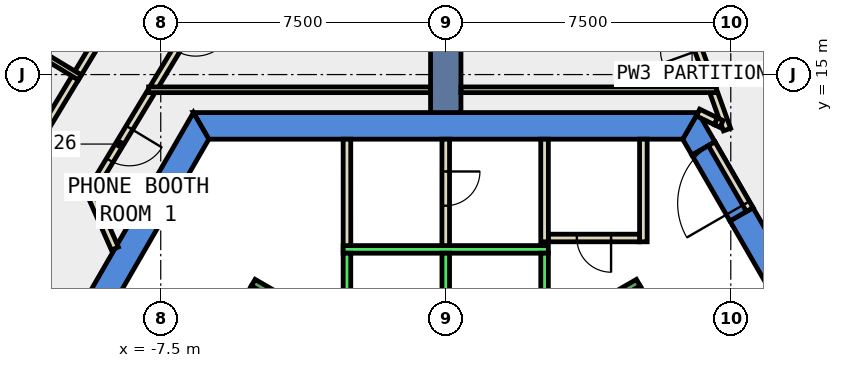
"""IFC4 building model, lengths in metres.
Left out: names, types, materials, properties, quantities, classifications, styles, units other than length and angle.
Written with IfcOpenShell. Run it as: python <this file> out.ifc"""

import sys

from ifc_helpers import new_model, si_unit, direction, frame, frame_2d, origin, place, context, subcontext, project, spatial, polyline, rectangle, outline, extrude, element, fill, save


model = new_model("IFC4")
c1 = context("Model", 3, precision=1e-05, world=origin(), true_north=direction((0.0, 1.0)))
c2 = subcontext(c1, "Body", "Model", "MODEL_VIEW")
j1 = project(units=[si_unit("LENGTHUNIT", "METRE"), si_unit("PLANEANGLEUNIT", "RADIAN")], contexts=[c1])
p1 = place(None, origin())
s1 = spatial("IfcSite", under=j1, at=p1, CompositionType="ELEMENT")
p2 = place(p1, origin())
s2 = spatial("IfcBuilding", under=s1, at=p2, CompositionType="ELEMENT")
p3 = place(p2, frame((0.0, 0.0, 194.0)))
s3 = spatial("IfcBuildingStorey", under=s2, at=p3, CompositionType="ELEMENT", Elevation=194.0)
p4 = place(p3, frame((0.0, 0.0, -0.4)))
e1 = element("IfcWall", 1, at=p4, inside=s3, PredefinedType="SHEAR", context=c2, shape_type="SweptSolid", body=[
    extrude(outline(polyline([(8.084, 11.498), (7.478, 11.148), (12.471, 2.5), (13.279, 2.5), (8.084, 11.498)])), origin(), (0.0, 0.0, 1.0), 4.2),
])
p5 = place(p3, frame((0.0, 0.0, -0.4)))
e2 = element("IfcWall", 2, at=p5, inside=s3, PredefinedType="SHEAR", context=c2, shape_type="SweptSolid", body=[
    extrude(outline(polyline([(6.478, 12.88), (7.084, 13.23), (6.64, 14.0), (6.235, 13.3), (6.478, 12.88)])), origin(), (0.0, 0.0, 1.0), 4.2),
])
p6 = place(p3, frame((0.0, 0.0, 3.6)))
e3 = element("IfcWall", 3, at=p6, inside=s3, PredefinedType="SHEAR", context=c2, shape_type="SweptSolid", body=[
    extrude(outline(polyline([(7.084, 13.23), (6.478, 12.88), (7.478, 11.148), (8.084, 11.498), (7.084, 13.23)])), origin(), (0.0, 0.0, 1.0), 0.2),
])
p7 = place(p3, frame((0.0, 0.0, -0.4)))
e4 = element("IfcWall", 4, at=p7, inside=s3, PredefinedType="SHEAR", context=c2, shape_type="SweptSolid", body=[
    extrude(outline(polyline([(6.64, 14.0), (-6.64, 14.0), (-6.235, 13.3), (6.235, 13.3), (6.64, 14.0)])), origin(), (0.0, 0.0, 1.0), 4.2),
])
p8 = place(p3, frame((0.0, 0.0, -0.4)))
e5 = element("IfcWall", 5, at=p8, inside=s3, PredefinedType="SHEAR", context=c2, shape_type="SweptSolid", body=[
    extrude(outline(polyline([(-11.834, 5.002), (-11.228, 4.652), (-6.235, 13.3), (-6.64, 14.0), (-11.834, 5.002)])), origin(), (0.0, 0.0, 1.0), 4.2),
])
p9 = place(p3, frame((0.0, 14.0, -0.4), z_axis=(0.0, 0.0, 1.0), x_axis=(0.0, 1.0, 0.0)))
e6 = element("IfcWall", 6, at=p9, inside=s3, PredefinedType="SHEAR", context=c2, shape_type="SweptSolid", body=[
    extrude(rectangle(XDim=9.0, YDim=0.8, at=frame_2d((4.5, 0.0))), origin(), (0.0, 0.0, 1.0), 4.2),
])
p10 = place(p3, frame((6.64, 14.0, 0.0), z_axis=(0.0, 0.0, 1.0), x_axis=(0.899046412443, -0.437853341055, 0.0)))
e7 = element("IfcWall", 7, at=p10, inside=s3, PredefinedType="PARTITIONING", context=c2, shape_type="SweptSolid", body=[
    extrude(rectangle(XDim=0.523, YDim=0.2, at=frame_2d((0.261, 0.0))), origin(), (0.0, 0.0, 1.0), 3.8),
])
p11 = place(p3, frame((7.401, 13.552, 0.0), z_axis=(0.0, 0.0, 1.0), x_axis=(-0.337944878606, 0.941165904091, 0.0)))
e8 = element("IfcWall", 8, at=p11, inside=s3, PredefinedType="PARTITIONING", context=c2, shape_type="SweptSolid", body=[
    extrude(rectangle(XDim=1.038, YDim=0.2, at=frame_2d((0.519, 0.0))), origin(), (0.0, 0.0, 1.0), 3.8),
])
p12 = place(p3, frame((-7.759, 14.536, 0.0), z_axis=(0.0, 0.0, 1.0), x_axis=(-0.516926279395, -0.856029918678, 0.0)))
e9 = element("IfcWall", 9, at=p12, inside=s3, PredefinedType="PARTITIONING", context=c2, shape_type="SweptSolid", body=[
    extrude(rectangle(XDim=3.188, YDim=0.2, at=frame_2d((1.594, 0.0))), origin(), (0.0, 0.0, 1.0), 3.8),
])
p13 = place(p12, frame((1.094, 0.0, 0.0)))
e10 = element("IfcOpeningElement", 10, at=p13, cuts=e9, PredefinedType="OPENING", context=c2, shape_type="SweptSolid", body=[
    extrude(rectangle(XDim=1.0, YDim=2.1, at=frame_2d((0.5, 1.05))), frame((0.0, 0.11, 0.0), z_axis=(0.0, -1.0, 0.0), x_axis=(1.0, 0.0, 0.0)), (0.0, 0.0, 1.0), 0.22),
])
p14 = place(p3, frame((-9.315, 11.801, 0.0), z_axis=(0.0, 0.0, 1.0), x_axis=(0.403943240321, -0.914784050254, 0.0)))
e11 = element("IfcWall", 11, at=p14, inside=s3, PredefinedType="PARTITIONING", context=c2, shape_type="SweptSolid", body=[
    extrude(rectangle(XDim=1.507, YDim=0.2, at=frame_2d((0.754, 0.0))), origin(), (0.0, 0.0, 1.0), 3.8),
])
p15 = place(p3, frame((6.999, 14.671, 0.0), z_axis=(0.0, 0.0, 1.0), x_axis=(-0.338795881304, 0.940859899672, 0.0)))
e12 = element("IfcWall", 12, at=p15, inside=s3, PredefinedType="PARTITIONING", context=c2, shape_type="SweptSolid", body=[
    extrude(rectangle(XDim=3.055, YDim=0.2, at=frame_2d((1.527, 0.0))), origin(), (0.0, 0.0, 1.0), 3.8),
])
p16 = place(p15, frame((1.027, 0.0, 0.0)))
e13 = element("IfcOpeningElement", 13, at=p16, cuts=e12, PredefinedType="OPENING", context=c2, shape_type="SweptSolid", body=[
    extrude(rectangle(XDim=1.0, YDim=2.1, at=frame_2d((0.5, 1.05))), frame((0.0, 0.11, 0.0), z_axis=(0.0, -1.0, 0.0), x_axis=(1.0, 0.0, 0.0)), (0.0, 0.0, 1.0), 0.22),
])
p17 = place(p3, frame((-5.998, 17.451, 0.0), z_axis=(0.0, 0.0, 1.0), x_axis=(-0.516919907997, -0.856033766108, 0.0)))
e14 = element("IfcWall", 14, at=p17, inside=s3, PredefinedType="PARTITIONING", context=c2, shape_type="SweptSolid", body=[
    extrude(rectangle(XDim=3.256, YDim=0.2, at=frame_2d((1.628, 0.0))), origin(), (0.0, 0.0, 1.0), 3.8),
])
p18 = place(p17, frame((1.128, 0.0, 0.0)))
e15 = element("IfcOpeningElement", 15, at=p18, cuts=e14, PredefinedType="OPENING", context=c2, shape_type="SweptSolid", body=[
    extrude(rectangle(XDim=1.0, YDim=2.1, at=frame_2d((0.5, 1.05))), frame((0.0, 0.11, 0.0), z_axis=(0.0, -1.0, 0.0), x_axis=(1.0, 0.0, 0.0)), (0.0, 0.0, 1.0), 0.22),
])
p19 = place(p3, frame((7.615, 18.449, 0.0), z_axis=(0.0, 0.0, 1.0), x_axis=(0.516918251554, -0.856034766356, 0.0)))
e16 = element("IfcWall", 16, at=p19, inside=s3, PredefinedType="PARTITIONING", context=c2, shape_type="SweptSolid", body=[
    extrude(rectangle(XDim=3.983, YDim=0.2, at=frame_2d((1.992, 0.0))), origin(), (0.0, 0.0, 1.0), 3.8),
])
p20 = place(p19, frame((1.492, 0.0, 0.0)))
e17 = element("IfcOpeningElement", 17, at=p20, cuts=e16, PredefinedType="OPENING", context=c2, shape_type="SweptSolid", body=[
    extrude(rectangle(XDim=1.0, YDim=2.1, at=frame_2d((0.5, 1.05))), frame((0.0, 0.11, 0.0), z_axis=(0.0, -1.0, 0.0), x_axis=(1.0, 0.0, 0.0)), (0.0, 0.0, 1.0), 0.22),
])
p21 = place(p3, frame((-9.674, 15.039, 0.0), z_axis=(0.0, 0.0, 1.0), x_axis=(0.516918251554, 0.856034766356, 0.0)))
e18 = element("IfcWall", 18, at=p21, inside=s3, PredefinedType="PARTITIONING", context=c2, shape_type="SweptSolid", body=[
    extrude(rectangle(XDim=3.983, YDim=0.2, at=frame_2d((1.992, 0.0))), origin(), (0.0, 0.0, 1.0), 3.8),
])
p22 = place(p3, frame((-11.811, 11.503, 0.0), z_axis=(0.0, 0.0, 1.0), x_axis=(0.517135291957, 0.855903668535, 0.0)))
e19 = element("IfcWall", 19, at=p22, inside=s3, PredefinedType="PARTITIONING", context=c2, shape_type="SweptSolid", body=[
    extrude(rectangle(XDim=3.982, YDim=0.2, at=frame_2d((1.991, 0.0))), origin(), (0.0, 0.0, 1.0), 3.8),
])
p23 = place(p3, frame((5.2, 13.3, 0.0), z_axis=(0.0, 0.0, 1.0), x_axis=(0.0, -1.0, 0.0)))
e20 = element("IfcWall", 20, at=p23, inside=s3, PredefinedType="PARTITIONING", context=c2, shape_type="SweptSolid", body=[
    extrude(rectangle(XDim=2.7, YDim=0.2, at=frame_2d((1.35, 0.0))), origin(), (0.0, 0.0, 1.0), 3.8),
])
p24 = place(p3, frame((5.1, 10.7, 0.0), z_axis=(0.0, 0.0, 1.0), x_axis=(-1.0, 0.0, 0.0)))
e21 = element("IfcWall", 21, at=p24, inside=s3, PredefinedType="PARTITIONING", context=c2, shape_type="SweptSolid", body=[
    extrude(rectangle(XDim=2.4, YDim=0.2, at=frame_2d((1.2, 0.0))), origin(), (0.0, 0.0, 1.0), 3.8),
])
p25 = place(p24, frame((0.75, 0.0, 0.0)))
e22 = element("IfcOpeningElement", 22, at=p25, cuts=e21, PredefinedType="OPENING", context=c2, shape_type="SweptSolid", body=[
    extrude(rectangle(XDim=0.9, YDim=2.1, at=frame_2d((0.45, 1.05))), frame((0.0, 0.11, 0.0), z_axis=(0.0, -1.0, 0.0), x_axis=(1.0, 0.0, 0.0)), (0.0, 0.0, 1.0), 0.22),
])
p26 = place(p3, frame((2.6, 10.6, 0.0), z_axis=(0.0, 0.0, 1.0), x_axis=(0.0, 1.0, 0.0)))
e23 = element("IfcWall", 23, at=p26, inside=s3, PredefinedType="PARTITIONING", context=c2, shape_type="SweptSolid", body=[
    extrude(rectangle(XDim=2.7, YDim=0.2, at=frame_2d((1.35, 0.0))), origin(), (0.0, 0.0, 1.0), 3.8),
])
p27 = place(p3, frame((-2.599, 10.399, 0.0), z_axis=(0.0, 0.0, 1.0), x_axis=(-0.000336615314, 0.999999943345, 0.0)))
e24 = element("IfcWall", 24, at=p27, inside=s3, PredefinedType="PARTITIONING", context=c2, shape_type="SweptSolid", body=[
    extrude(rectangle(XDim=2.901, YDim=0.2, at=frame_2d((1.451, 0.0))), origin(), (0.0, 0.0, 1.0), 3.8),
])
p28 = place(p3, frame((0.0, 13.3, 0.0), z_axis=(0.0, 0.0, 1.0), x_axis=(-0.000336728662, -0.999999943307, 0.0)))
e25 = element("IfcWall", 25, at=p28, inside=s3, PredefinedType="PARTITIONING", context=c2, shape_type="SweptSolid", body=[
    extrude(rectangle(XDim=2.9, YDim=0.2, at=frame_2d((1.45, 0.0))), origin(), (0.0, 0.0, 1.0), 3.8),
])
p29 = place(p28, frame((0.85, 0.0, 0.0)))
e26 = element("IfcOpeningElement", 26, at=p29, cuts=e25, PredefinedType="OPENING", context=c2, shape_type="SweptSolid", body=[
    extrude(rectangle(XDim=0.9, YDim=2.1, at=frame_2d((0.45, 1.05))), frame((0.0, 0.11, 0.0), z_axis=(0.0, -1.0, 0.0), x_axis=(1.0, 0.0, 0.0)), (0.0, 0.0, 1.0), 0.22),
])
p30 = place(p3, frame((7.124, 14.6, 0.0), z_axis=(0.0, 0.0, 1.0), x_axis=(-1.0, 0.0, 0.0)))
e27 = element("IfcWall", 27, at=p30, inside=s3, PredefinedType="PARTITIONING", context=c2, shape_type="SweptSolid", body=[
    extrude(rectangle(XDim=6.724, YDim=0.15, at=frame_2d((3.362, 0.0))), origin(), (0.0, 0.0, 1.0), 3.8),
])
p31 = place(p3, frame((-0.4, 14.6, 0.0), z_axis=(0.0, 0.0, 1.0), x_axis=(-1.0, 0.0, 0.0)))
e28 = element("IfcWall", 28, at=p31, inside=s3, PredefinedType="PARTITIONING", context=c2, shape_type="SweptSolid", body=[
    extrude(rectangle(XDim=7.42, YDim=0.15, at=frame_2d((3.71, 0.0))), origin(), (0.0, 0.0, 1.0), 3.8),
])
p32 = place(p3, frame((-9.628, 14.924, 0.0), z_axis=(0.0, 0.0, 1.0), x_axis=(-0.855931736607, 0.517088834021, 0.0)))
e29 = element("IfcWall", 29, at=p32, inside=s3, PredefinedType="PARTITIONING", context=c2, shape_type="SweptSolid", body=[
    extrude(rectangle(XDim=5.699, YDim=0.15, at=frame_2d((2.85, 0.0))), origin(), (0.0, 0.0, 1.0), 3.8),
])
p33 = place(p3, frame((7.997, 11.448, 0.0), z_axis=(0.0, 0.0, 1.0), x_axis=(-0.50002537861, 0.866010750942, 0.0)))
e30 = element("IfcWall", 30, at=p33, inside=s3, PredefinedType="PARTITIONING", context=c2, shape_type="SweptSolid", body=[
    extrude(rectangle(XDim=2.0, YDim=0.2, at=frame_2d((1.0, 0.0))), origin(), (0.0, 0.0, 1.0), 2.4),
])
p34 = place(p33, frame((0.19, 0.0, 0.0)))
e31 = element("IfcOpeningElement", 31, at=p34, cuts=e30, PredefinedType="OPENING", context=c2, shape_type="SweptSolid", body=[
    extrude(rectangle(XDim=1.8, YDim=2.1, at=frame_2d((0.9, 1.05))), frame((0.0, 0.11, 0.0), z_axis=(0.0, -1.0, 0.0), x_axis=(1.0, 0.0, 0.0)), (0.0, 0.0, 1.0), 0.22),
])
p35 = place(p3, frame((7.11, 13.771, 0.0), z_axis=(0.0, 0.0, 1.0), x_axis=(0.900120852209, -0.435640277545, 0.0)))
e32 = element("IfcWall", 32, at=p35, inside=s3, PredefinedType="PARTITIONING", context=c2, shape_type="SweptSolid", body=[
    extrude(rectangle(XDim=0.161, YDim=0.2, at=frame_2d((0.081, 0.0))), origin(), (0.0, 0.0, 1.0), 2.4),
])
p36 = place(p3, frame((2.7, 10.4, 0.0), z_axis=(0.0, 0.0, 1.0), x_axis=(-1.0, 0.0, 0.0)))
e33 = element("IfcWall", 33, at=p36, inside=s3, PredefinedType="STANDARD", context=c2, shape_type="SweptSolid", body=[
    extrude(rectangle(XDim=5.4, YDim=0.2, at=frame_2d((2.7, 0.0))), origin(), (0.0, 0.0, 1.0), 3.8),
])
for number, where, z_axis, x_axis in (
    (34, (2.6, 7.9, 0.0), (0.0, 0.0, 1.0), (0.0, 1.0, 0.0)),
    (35, (0.0, 7.9, 0.0), (0.0, 0.0, 1.0), (0.0, 1.0, 0.0)),
    (36, (-2.6, 7.9, 0.0), (0.0, 0.0, 1.0), (0.0, 1.0, 0.0)),
):
    element("IfcWall", number, at=place(p3, frame(where, z_axis=z_axis, x_axis=x_axis)), inside=s3, PredefinedType="STANDARD", context=c2, shape_type="SweptSolid", body=[
        extrude(rectangle(XDim=2.4, YDim=0.2, at=frame_2d((1.2, 0.0))), origin(), (0.0, 0.0, 1.0), 3.8),
    ])
p37 = place(p3, frame((2.7, 8.158, 0.0), z_axis=(0.0, 0.0, 1.0), x_axis=(0.86611865017, 0.499838457731, 0.0)))
e37 = element("IfcWall", 37, at=p37, inside=s3, PredefinedType="STANDARD", context=c2, shape_type="SweptSolid", body=[
    extrude(rectangle(XDim=2.733, YDim=0.2, at=frame_2d((1.366, 0.0))), origin(), (0.0, 0.0, 1.0), 3.8),
])
p38 = place(p3, frame((8.48, 3.412, 0.0), z_axis=(0.0, 0.0, 1.0), x_axis=(-0.499978703459, 0.866037698999, 0.0)))
e38 = element("IfcWall", 38, at=p38, inside=s3, PredefinedType="STANDARD", context=c2, shape_type="SweptSolid", body=[
    extrude(rectangle(XDim=6.9, YDim=0.2, at=frame_2d((3.45, 0.0))), origin(), (0.0, 0.0, 1.0), 3.8),
])
p39 = place(p3, frame((-1.256, 7.324, 0.0), z_axis=(0.0, 0.0, 1.0), x_axis=(-0.866046073146, 0.499964197906, 0.0)))
e39 = element("IfcWall", 39, at=p39, inside=s3, PredefinedType="STANDARD", context=c2, shape_type="SweptSolid", body=[
    extrude(rectangle(XDim=4.4, YDim=0.2, at=frame_2d((2.2, 0.0))), origin(), (0.0, 0.0, 1.0), 3.8),
])
p40 = place(p39, frame((2.4, 0.0, 0.0)))
e40 = element("IfcOpeningElement", 40, at=p40, cuts=e39, PredefinedType="OPENING", context=c2, shape_type="SweptSolid", body=[
    extrude(rectangle(XDim=1.1, YDim=2.2, at=frame_2d((0.55, 1.1))), frame((0.0, 0.11, 0.0), z_axis=(0.0, -1.0, 0.0), x_axis=(1.0, 0.0, 0.0)), (0.0, 0.0, 1.0), 0.22),
])
p41 = place(p3, frame((-5.03, 9.388, 0.0), z_axis=(0.0, 0.0, 1.0), x_axis=(-0.499978703459, -0.866037698999, 0.0)))
e41 = element("IfcWall", 41, at=p41, inside=s3, PredefinedType="STANDARD", context=c2, shape_type="SweptSolid", body=[
    extrude(rectangle(XDim=6.9, YDim=0.2, at=frame_2d((3.45, 0.0))), origin(), (0.0, 0.0, 1.0), 3.8),
])
p42 = place(p13, origin())
e42 = element("IfcDoor", 42, at=p42, inside=s3, OperationType="SINGLE_SWING_LEFT", PredefinedType="DOOR", context=c2, shape_type="SweptSolid", body=[
    extrude(rectangle(XDim=1.0, YDim=2.1, at=frame_2d((0.5, 1.05))), frame((0.0, 0.025, 0.0), z_axis=(0.0, -1.0, 0.0), x_axis=(1.0, 0.0, 0.0)), (0.0, 0.0, 1.0), 0.05),
])
fill(e10, e42)
p43 = place(p25, origin())
e43 = element("IfcDoor", 43, at=p43, inside=s3, OperationType="SINGLE_SWING_RIGHT", PredefinedType="DOOR", context=c2, shape_type="SweptSolid", body=[
    extrude(rectangle(XDim=0.9, YDim=2.1, at=frame_2d((0.45, 1.05))), frame((0.0, 0.025, 0.0), z_axis=(0.0, -1.0, 0.0), x_axis=(1.0, 0.0, 0.0)), (0.0, 0.0, 1.0), 0.05),
])
fill(e22, e43)
p44 = place(p29, origin())
e44 = element("IfcDoor", 44, at=p44, inside=s3, OperationType="SINGLE_SWING_RIGHT", PredefinedType="DOOR", context=c2, shape_type="SweptSolid", body=[
    extrude(rectangle(XDim=0.9, YDim=2.1, at=frame_2d((0.45, 1.05))), frame((0.0, 0.025, 0.0), z_axis=(0.0, -1.0, 0.0), x_axis=(1.0, 0.0, 0.0)), (0.0, 0.0, 1.0), 0.05),
])
fill(e26, e44)
p45 = place(p34, origin())
e45 = element("IfcDoor", 45, at=p45, inside=s3, OperationType="DOUBLE_DOOR_SINGLE_SWING", PredefinedType="DOOR", context=c2, shape_type="SweptSolid", body=[
    extrude(rectangle(XDim=1.8, YDim=2.1, at=frame_2d((0.9, 1.05))), frame((0.0, 0.025, 0.0), z_axis=(0.0, -1.0, 0.0), x_axis=(1.0, 0.0, 0.0)), (0.0, 0.0, 1.0), 0.05),
])
fill(e31, e45)
save(model, sys.argv[1])
